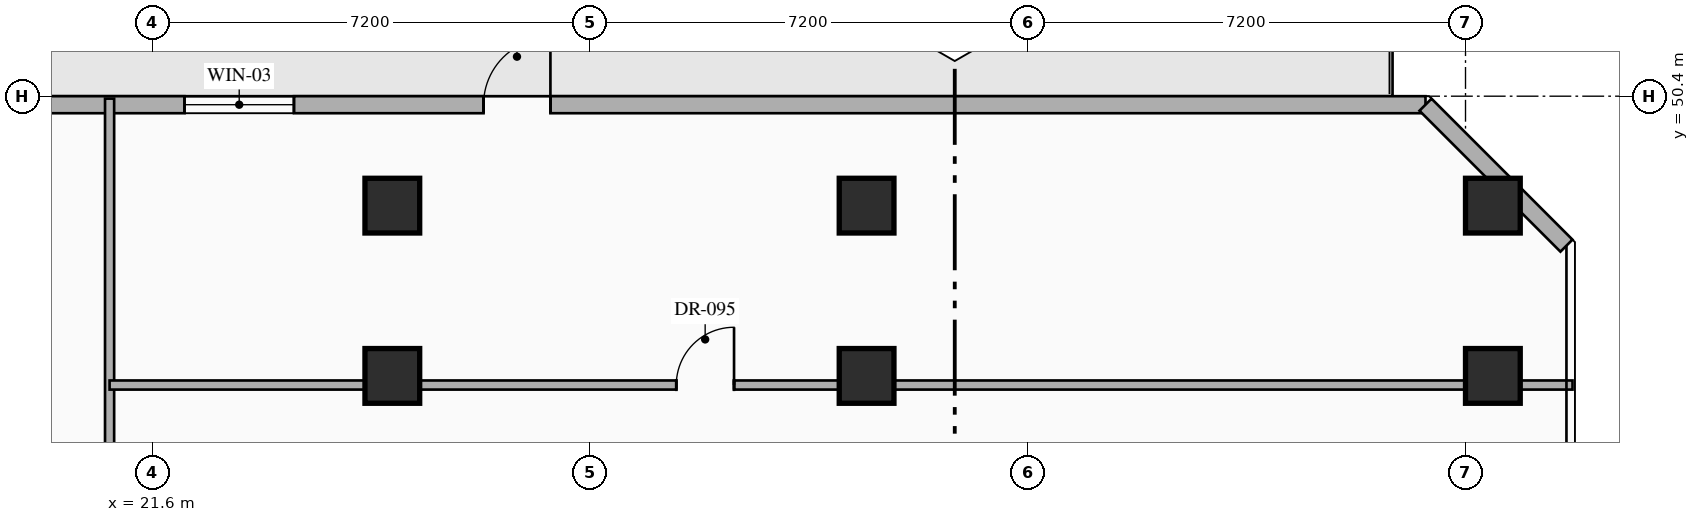
"""IFC4 building model, lengths in metres.
Left out: names, types, materials, properties, quantities, classifications, styles, units other than length and angle.
Written with IfcOpenShell. Run it as: python <this file> out.ifc"""

import sys

from ifc_helpers import new_model, si_unit, direction, frame, frame_2d, origin, origin_2d, place, context, subcontext, project, spatial, rectangle, hollow_rectangle, extrude, element, fill, save


model = new_model("IFC4")
c1 = context("Model", 3, precision=1e-05, world=origin(), true_north=direction((0.0, 1.0)))
c2 = subcontext(c1, "Body", "Model", "MODEL_VIEW")
j1 = project(units=[si_unit("LENGTHUNIT", "METRE"), si_unit("PLANEANGLEUNIT", "RADIAN")], contexts=[c1])
p1 = place(None, origin())
s1 = spatial("IfcSite", under=j1, at=p1, CompositionType="ELEMENT")
p2 = place(p1, origin())
s2 = spatial("IfcBuilding", under=s1, at=p2, CompositionType="ELEMENT")
p3 = place(p2, frame((0.0, 0.0, 104.85)))
s3 = spatial("IfcBuildingStorey", under=s2, at=p3, CompositionType="ELEMENT", Elevation=104.85)
for number, where, z_axis, x_axis in (
    (1, (25.55, 45.8, 0.0), (0.0, 0.0, 1.0), (1.0, 0.0, 0.0)),
    (2, (33.35, 45.8, 0.0), (0.0, 0.0, 1.0), (1.0, 0.0, 0.0)),
    (3, (43.65, 45.8, 0.0), (0.0, 0.0, 1.0), (1.0, 0.0, 0.0)),
    (4, (25.55, 48.6, 0.0), (0.0, 0.0, 1.0), (1.0, 0.0, 0.0)),
    (5, (33.35, 48.6, 0.0), (0.0, 0.0, 1.0), (1.0, 0.0, 0.0)),
    (6, (43.65, 48.6, 0.0), (0.0, 0.0, 1.0), (1.0, 0.0, 0.0)),
):
    element("IfcColumn", number, at=place(p3, frame(where, z_axis=z_axis, x_axis=x_axis)), inside=s3, PredefinedType="COLUMN", context=c2, shape_type="SweptSolid", body=[
        extrude(hollow_rectangle(XDim=0.9, YDim=0.9, WallThickness=0.036, at=origin_2d()), origin(), (0.0, 0.0, 1.0), 3.6),
    ])
p4 = place(p3, frame((12.058, 50.26, 0.0), z_axis=(0.0, 0.0, 1.0), x_axis=(1.0, 0.0, 0.0)))
e7 = element("IfcWall", 7, at=p4, inside=s3, PredefinedType="STANDARD", context=c2, shape_type="SweptSolid", body=[
    extrude(rectangle(XDim=30.484, YDim=0.28, at=frame_2d((15.242, 0.0))), origin(), (0.0, 0.0, 1.0), 3.35),
])
p5 = place(p4, frame((14.992, 0.0, 0.0)))
e8 = element("IfcOpeningElement", 8, at=p5, cuts=e7, PredefinedType="OPENING", context=c2, shape_type="SweptSolid", body=[
    extrude(rectangle(XDim=1.1, YDim=2.2, at=frame_2d((0.55, 1.1))), frame((0.0, 0.15, 0.0), z_axis=(0.0, -1.0, 0.0), x_axis=(1.0, 0.0, 0.0)), (0.0, 0.0, 1.0), 0.3),
])
p6 = place(p4, frame((10.074, 0.0, 0.85)))
e9 = element("IfcOpeningElement", 9, at=p6, cuts=e7, PredefinedType="OPENING", context=c2, shape_type="SweptSolid", body=[
    extrude(rectangle(XDim=1.8, YDim=2.1, at=frame_2d((0.9, 1.05))), frame((0.0, 0.15, 0.0), z_axis=(0.0, -1.0, 0.0), x_axis=(1.0, 0.0, 0.0)), (0.0, 0.0, 1.0), 0.3),
])
p7 = place(p3, frame((42.542, 50.26, 0.0), z_axis=(0.0, 0.0, 1.0), x_axis=(0.707106781187, -0.707106781187, 0.0)))
e10 = element("IfcWall", 10, at=p7, inside=s3, PredefinedType="STANDARD", context=c2, shape_type="SweptSolid", body=[
    extrude(rectangle(XDim=3.278, YDim=0.28, at=frame_2d((1.639, 0.0))), origin(), (0.0, 0.0, 1.0), 3.35),
])
p8 = place(p3, frame((20.9, 23.44, 0.0), z_axis=(0.0, 0.0, 1.0), x_axis=(0.0, 1.0, 0.0)))
e11 = element("IfcWall", 11, at=p8, inside=s3, PredefinedType="PARTITIONING", context=c2, shape_type="SweptSolid", body=[
    extrude(rectangle(XDim=26.92, YDim=0.15, at=frame_2d((13.46, 0.0))), origin(), (0.0, 0.0, 1.0), 3.35),
])
p9 = place(p8, frame((7.943, 0.0, 0.0)))
e12 = element("IfcOpeningElement", 12, at=p9, cuts=e11, PredefinedType="OPENING", context=c2, shape_type="SweptSolid", body=[
    extrude(rectangle(XDim=0.95, YDim=2.15, at=frame_2d((0.475, 1.075))), frame((0.0, 0.085, 0.0), z_axis=(0.0, -1.0, 0.0), x_axis=(1.0, 0.0, 0.0)), (0.0, 0.0, 1.0), 0.17),
])
p10 = place(p3, frame((20.9, 45.65, 0.0), z_axis=(0.0, 0.0, 1.0), x_axis=(1.0, 0.0, 0.0)))
e13 = element("IfcWall", 13, at=p10, inside=s3, PredefinedType="PARTITIONING", context=c2, shape_type="SweptSolid", body=[
    extrude(rectangle(XDim=24.06, YDim=0.15, at=frame_2d((12.03, 0.0))), origin(), (0.0, 0.0, 1.0), 2.695),
])
p11 = place(p10, frame((9.32, 0.0, 0.0)))
e14 = element("IfcOpeningElement", 14, at=p11, cuts=e13, PredefinedType="OPENING", context=c2, shape_type="SweptSolid", body=[
    extrude(rectangle(XDim=0.95, YDim=2.15, at=frame_2d((0.475, 1.075))), frame((0.0, 0.085, 0.0), z_axis=(0.0, -1.0, 0.0), x_axis=(1.0, 0.0, 0.0)), (0.0, 0.0, 1.0), 0.17),
])
p12 = place(p5, origin())
e15 = element("IfcDoor", 15, at=p12, inside=s3, OperationType="SINGLE_SWING_RIGHT", PredefinedType="DOOR", context=c2, shape_type="SweptSolid", body=[
    extrude(rectangle(XDim=1.1, YDim=2.2, at=frame_2d((0.55, 1.1))), frame((0.0, 0.025, 0.0), z_axis=(0.0, -1.0, 0.0), x_axis=(1.0, 0.0, 0.0)), (0.0, 0.0, 1.0), 0.05),
])
fill(e8, e15)
p13 = place(p6, origin())
e16 = element("IfcWindow", 16, at=p13, inside=s3, PartitioningType="SINGLE_PANEL", PredefinedType="WINDOW", context=c2, shape_type="SweptSolid", body=[
    extrude(rectangle(XDim=1.8, YDim=2.1, at=frame_2d((0.9, 1.05))), frame((0.0, 0.03, 0.0), z_axis=(0.0, -1.0, 0.0), x_axis=(1.0, 0.0, 0.0)), (0.0, 0.0, 1.0), 0.06),
])
fill(e9, e16)
p14 = place(p11, origin())
e17 = element("IfcDoor", 17, at=p14, inside=s3, OperationType="SINGLE_SWING_RIGHT", PredefinedType="DOOR", context=c2, shape_type="SweptSolid", body=[
    extrude(rectangle(XDim=0.95, YDim=2.15, at=frame_2d((0.475, 1.075))), frame((0.0, 0.025, 0.0), z_axis=(0.0, -1.0, 0.0), x_axis=(1.0, 0.0, 0.0)), (0.0, 0.0, 1.0), 0.05),
])
fill(e14, e17)
save(model, sys.argv[1])
